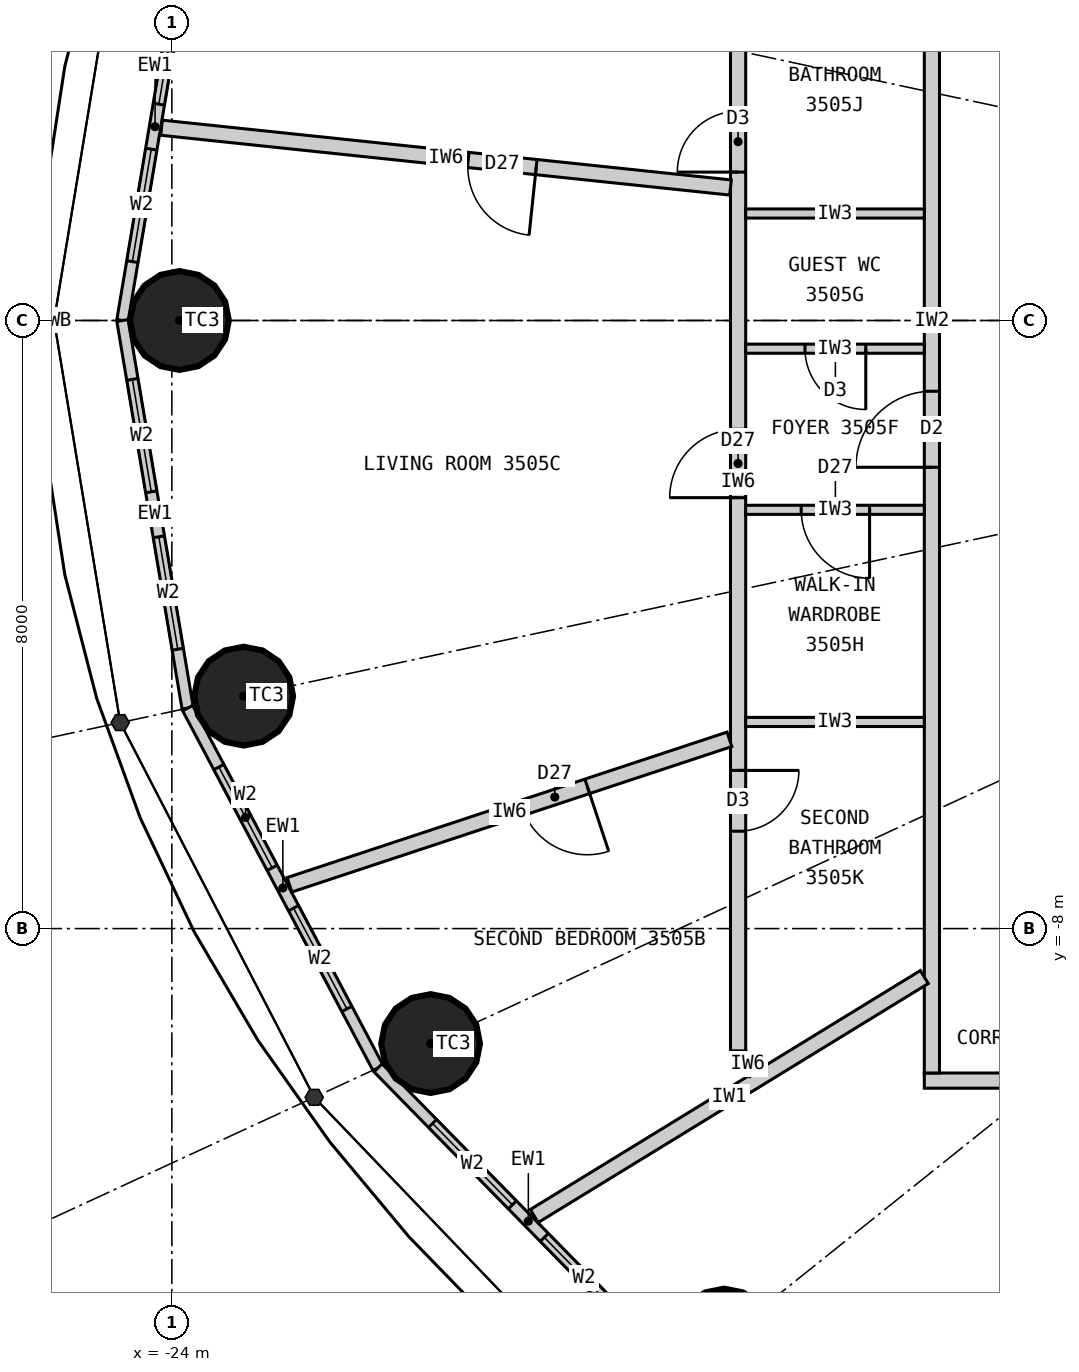
"""IFC4 building model, lengths in metres.
Left out: names, types, materials, properties, quantities, classifications, styles, units other than length and angle.
Written with IfcOpenShell. Run it as: python <this file> out.ifc"""

import sys

from ifc_helpers import new_model, si_unit, direction, frame, frame_2d, origin, origin_2d, place, context, subcontext, project, spatial, rectangle, circle, extrude, clip, halfspace, element, fill, save


model = new_model("IFC4")
c1 = context("Model", 3, precision=1e-05, world=origin(), true_north=direction((0.0, 1.0)))
c2 = subcontext(c1, "Body", "Model", "MODEL_VIEW")
j1 = project(units=[si_unit("LENGTHUNIT", "METRE"), si_unit("PLANEANGLEUNIT", "RADIAN")], contexts=[c1])
p1 = place(None, origin())
s1 = spatial("IfcSite", under=j1, at=p1, CompositionType="ELEMENT")
p2 = place(p1, origin())
s2 = spatial("IfcBuilding", under=s1, at=p2, CompositionType="ELEMENT")
p3 = place(p2, frame((0.0, 0.0, 135.3)))
s3 = spatial("IfcBuildingStorey", under=s2, at=p3, CompositionType="ELEMENT", Elevation=135.3)
for number, where, z_axis, x_axis in (
    (1, (-23.9, 0.0, 0.0), (0.0, 0.0, 1.0), (1.0, 0.0, 0.0)),
    (2, (-23.055, -4.942, 0.0), (0.0, 0.0, 1.0), (1.0, 0.0, 0.0)),
    (3, (-20.596, -9.513, 0.0), (0.0, 0.0, 1.0), (1.0, 0.0, 0.0)),
    (4, (-16.734, -13.387, 0.0), (0.0, 0.0, 1.0), (1.0, 0.0, 0.0)),
):
    element("IfcColumn", number, at=place(p3, frame(where, z_axis=z_axis, x_axis=x_axis)), inside=s3, PredefinedType="COLUMN", context=c2, shape_type="Clipping", body=[
        clip(extrude(circle(Radius=0.65, at=origin_2d()), origin(), (0.0, 0.0, 1.0), 3.3), halfspace(frame((0.0, 0.0, 2.25), z_axis=(0.0, 0.0, 1.0), x_axis=(1.0, 0.0, 0.0)), False)),
    ])
p4 = place(p3, frame((-23.792, 5.1, 0.0), z_axis=(0.0, 0.0, 1.0), x_axis=(-0.165883894218, -0.986145290329, 0.0)))
e5 = element("IfcWall", 5, at=p4, inside=s3, PredefinedType="ELEMENTEDWALL", context=c2, shape_type="SweptSolid", body=[
    extrude(rectangle(XDim=5.172, YDim=0.15, at=frame_2d((2.586, 0.0))), origin(), (0.0, 0.0, 1.0), 3.05),
])
p5 = place(p4, frame((0.786, 0.0, 0.9)))
e6 = element("IfcOpeningElement", 6, at=p5, cuts=e5, PredefinedType="OPENING", context=c2, shape_type="SweptSolid", body=[
    extrude(rectangle(XDim=1.5, YDim=1.9, at=frame_2d((0.75, 0.95))), frame((0.0, 0.085, 0.0), z_axis=(0.0, -1.0, 0.0), x_axis=(1.0, 0.0, 0.0)), (0.0, 0.0, 1.0), 0.17),
])
p6 = place(p4, frame((2.886, 0.0, 0.9)))
e7 = element("IfcOpeningElement", 7, at=p6, cuts=e5, PredefinedType="OPENING", context=c2, shape_type="SweptSolid", body=[
    extrude(rectangle(XDim=1.5, YDim=1.9, at=frame_2d((0.75, 0.95))), frame((0.0, 0.085, 0.0), z_axis=(0.0, -1.0, 0.0), x_axis=(1.0, 0.0, 0.0)), (0.0, 0.0, 1.0), 0.17),
])
p7 = place(p3, frame((-24.65, 0.0, 0.0), z_axis=(0.0, 0.0, 1.0), x_axis=(0.165883894218, -0.986145290329, 0.0)))
e8 = element("IfcWall", 8, at=p7, inside=s3, PredefinedType="ELEMENTEDWALL", context=c2, shape_type="SweptSolid", body=[
    extrude(rectangle(XDim=5.172, YDim=0.15, at=frame_2d((2.586, 0.0))), origin(), (0.0, 0.0, 1.0), 3.05),
])
p8 = place(p7, frame((0.786, 0.0, 0.9)))
e9 = element("IfcOpeningElement", 9, at=p8, cuts=e8, PredefinedType="OPENING", context=c2, shape_type="SweptSolid", body=[
    extrude(rectangle(XDim=1.5, YDim=1.9, at=frame_2d((0.75, 0.95))), frame((0.0, 0.085, 0.0), z_axis=(0.0, -1.0, 0.0), x_axis=(1.0, 0.0, 0.0)), (0.0, 0.0, 1.0), 0.17),
])
p9 = place(p7, frame((2.886, 0.0, 0.9)))
e10 = element("IfcOpeningElement", 10, at=p9, cuts=e8, PredefinedType="OPENING", context=c2, shape_type="SweptSolid", body=[
    extrude(rectangle(XDim=1.5, YDim=1.9, at=frame_2d((0.75, 0.95))), frame((0.0, 0.085, 0.0), z_axis=(0.0, -1.0, 0.0), x_axis=(1.0, 0.0, 0.0)), (0.0, 0.0, 1.0), 0.17),
])
p10 = place(p3, frame((-23.792, -5.1, 0.0), z_axis=(0.0, 0.0, 1.0), x_axis=(0.467814388454, -0.883826735257, 0.0)))
e11 = element("IfcWall", 11, at=p10, inside=s3, PredefinedType="ELEMENTEDWALL", context=c2, shape_type="SweptSolid", body=[
    extrude(rectangle(XDim=5.354, YDim=0.15, at=frame_2d((2.677, 0.0))), origin(), (0.0, 0.0, 1.0), 3.05),
])
p11 = place(p10, frame((0.877, 0.0, 0.9)))
e12 = element("IfcOpeningElement", 12, at=p11, cuts=e11, PredefinedType="OPENING", context=c2, shape_type="SweptSolid", body=[
    extrude(rectangle(XDim=1.5, YDim=1.9, at=frame_2d((0.75, 0.95))), frame((0.0, 0.085, 0.0), z_axis=(0.0, -1.0, 0.0), x_axis=(1.0, 0.0, 0.0)), (0.0, 0.0, 1.0), 0.17),
])
p12 = place(p10, frame((2.977, 0.0, 0.9)))
e13 = element("IfcOpeningElement", 13, at=p12, cuts=e11, PredefinedType="OPENING", context=c2, shape_type="SweptSolid", body=[
    extrude(rectangle(XDim=1.5, YDim=1.9, at=frame_2d((0.75, 0.95))), frame((0.0, 0.085, 0.0), z_axis=(0.0, -1.0, 0.0), x_axis=(1.0, 0.0, 0.0)), (0.0, 0.0, 1.0), 0.17),
])
p13 = place(p3, frame((-21.287, -9.832, 0.0), z_axis=(0.0, 0.0, 1.0), x_axis=(0.700136650834, -0.714008872605, 0.0)))
e14 = element("IfcWall", 14, at=p13, inside=s3, PredefinedType="ELEMENTEDWALL", context=c2, shape_type="SweptSolid", body=[
    extrude(rectangle(XDim=5.649, YDim=0.15, at=frame_2d((2.825, 0.0))), origin(), (0.0, 0.0, 1.0), 3.05),
])
p14 = place(p13, frame((1.025, 0.0, 0.9)))
e15 = element("IfcOpeningElement", 15, at=p14, cuts=e14, PredefinedType="OPENING", context=c2, shape_type="SweptSolid", body=[
    extrude(rectangle(XDim=1.5, YDim=1.9, at=frame_2d((0.75, 0.95))), frame((0.0, 0.085, 0.0), z_axis=(0.0, -1.0, 0.0), x_axis=(1.0, 0.0, 0.0)), (0.0, 0.0, 1.0), 0.17),
])
p15 = place(p13, frame((3.125, 0.0, 0.9)))
e16 = element("IfcOpeningElement", 16, at=p15, cuts=e14, PredefinedType="OPENING", context=c2, shape_type="SweptSolid", body=[
    extrude(rectangle(XDim=1.5, YDim=1.9, at=frame_2d((0.75, 0.95))), frame((0.0, 0.085, 0.0), z_axis=(0.0, -1.0, 0.0), x_axis=(1.0, 0.0, 0.0)), (0.0, 0.0, 1.0), 0.17),
])
p16 = place(p3, frame((14.1, -10.0, 0.0), z_axis=(0.0, 0.0, 1.0), x_axis=(-1.0, 0.0, 0.0)))
e17 = element("IfcWall", 17, at=p16, inside=s3, PredefinedType="PARTITIONING", context=c2, shape_type="SweptSolid", body=[
    extrude(rectangle(XDim=28.2, YDim=0.2, at=frame_2d((14.1, 0.0))), origin(), (0.0, 0.0, 1.0), 3.05),
])
p17 = place(p16, frame((25.754, 0.0, 0.0)))
e18 = element("IfcOpeningElement", 18, at=p17, cuts=e17, PredefinedType="OPENING", context=c2, shape_type="SweptSolid", body=[
    extrude(rectangle(XDim=1.0, YDim=2.2, at=frame_2d((0.5, 1.1))), frame((0.0, 0.11, 0.0), z_axis=(0.0, -1.0, 0.0), x_axis=(1.0, 0.0, 0.0)), (0.0, 0.0, 1.0), 0.22),
])
p18 = place(p16, frame((18.029, 0.0, 0.0)))
e19 = element("IfcOpeningElement", 19, at=p18, cuts=e17, PredefinedType="OPENING", context=c2, shape_type="SweptSolid", body=[
    extrude(rectangle(XDim=1.0, YDim=2.2, at=frame_2d((0.5, 1.1))), frame((0.0, 0.11, 0.0), z_axis=(0.0, -1.0, 0.0), x_axis=(1.0, 0.0, 0.0)), (0.0, 0.0, 1.0), 0.22),
])
p19 = place(p16, frame((12.884, 0.0, 0.0)))
e20 = element("IfcOpeningElement", 20, at=p19, cuts=e17, PredefinedType="OPENING", context=c2, shape_type="SweptSolid", body=[
    extrude(rectangle(XDim=1.0, YDim=2.2, at=frame_2d((0.5, 1.1))), frame((0.0, 0.11, 0.0), z_axis=(0.0, -1.0, 0.0), x_axis=(1.0, 0.0, 0.0)), (0.0, 0.0, 1.0), 0.22),
])
p20 = place(p16, frame((9.075, 0.0, 0.0)))
e21 = element("IfcOpeningElement", 21, at=p20, cuts=e17, PredefinedType="OPENING", context=c2, shape_type="SweptSolid", body=[
    extrude(rectangle(XDim=1.0, YDim=2.2, at=frame_2d((0.5, 1.1))), frame((0.0, 0.11, 0.0), z_axis=(0.0, -1.0, 0.0), x_axis=(1.0, 0.0, 0.0)), (0.0, 0.0, 1.0), 0.22),
])
p21 = place(p16, frame((3.59, 0.0, 0.0)))
e22 = element("IfcOpeningElement", 22, at=p21, cuts=e17, PredefinedType="OPENING", context=c2, shape_type="SweptSolid", body=[
    extrude(rectangle(XDim=1.0, YDim=2.2, at=frame_2d((0.5, 1.1))), frame((0.0, 0.11, 0.0), z_axis=(0.0, -1.0, 0.0), x_axis=(1.0, 0.0, 0.0)), (0.0, 0.0, 1.0), 0.22),
])
p22 = place(p3, frame((-14.0, 9.9, 0.0), z_axis=(0.0, 0.0, 1.0), x_axis=(0.0, -1.0, 0.0)))
e23 = element("IfcWall", 23, at=p22, inside=s3, PredefinedType="PARTITIONING", context=c2, shape_type="SweptSolid", body=[
    extrude(rectangle(XDim=19.8, YDim=0.2, at=frame_2d((9.9, 0.0))), origin(), (0.0, 0.0, 1.0), 3.05),
])
p23 = place(p22, frame((1.025, 0.0, 0.0)))
e24 = element("IfcOpeningElement", 24, at=p23, cuts=e23, PredefinedType="OPENING", context=c2, shape_type="SweptSolid", body=[
    extrude(rectangle(XDim=1.0, YDim=2.2, at=frame_2d((0.5, 1.1))), frame((0.0, 0.11, 0.0), z_axis=(0.0, -1.0, 0.0), x_axis=(1.0, 0.0, 0.0)), (0.0, 0.0, 1.0), 0.22),
])
p24 = place(p22, frame((10.831, 0.0, 0.0)))
e25 = element("IfcOpeningElement", 25, at=p24, cuts=e23, PredefinedType="OPENING", context=c2, shape_type="SweptSolid", body=[
    extrude(rectangle(XDim=1.0, YDim=2.2, at=frame_2d((0.5, 1.1))), frame((0.0, 0.11, 0.0), z_axis=(0.0, -1.0, 0.0), x_axis=(1.0, 0.0, 0.0)), (0.0, 0.0, 1.0), 0.22),
])
p25 = place(p3, frame((-14.1, -8.638, 0.0), z_axis=(0.0, 0.0, 1.0), x_axis=(-0.852706758009, -0.5223898782, 0.0)))
e26 = element("IfcWall", 26, at=p25, inside=s3, PredefinedType="PARTITIONING", context=c2, shape_type="SweptSolid", body=[
    extrude(rectangle(XDim=6.019, YDim=0.2, at=frame_2d((3.009, 0.0))), origin(), (0.0, 0.0, 1.0), 3.05),
])
p26 = place(p3, frame((-16.55, 5.351, 0.0), z_axis=(0.0, 0.0, 1.0), x_axis=(0.0, -1.0, 0.0)))
e27 = element("IfcWall", 27, at=p26, inside=s3, PredefinedType="PARTITIONING", context=c2, shape_type="SweptSolid", body=[
    extrude(rectangle(XDim=14.96, YDim=0.2, at=frame_2d((7.48, 0.0))), origin(), (0.0, 0.0, 1.0), 3.05),
])
p27 = place(p26, frame((2.599, 0.0, 0.0)))
e28 = element("IfcOpeningElement", 28, at=p27, cuts=e27, PredefinedType="OPENING", context=c2, shape_type="SweptSolid", body=[
    extrude(rectangle(XDim=0.8, YDim=2.1, at=frame_2d((0.4, 1.05))), frame((0.0, 0.11, 0.0), z_axis=(0.0, -1.0, 0.0), x_axis=(1.0, 0.0, 0.0)), (0.0, 0.0, 1.0), 0.22),
])
p28 = place(p26, frame((11.27, 0.0, 0.0)))
e29 = element("IfcOpeningElement", 29, at=p28, cuts=e27, PredefinedType="OPENING", context=c2, shape_type="SweptSolid", body=[
    extrude(rectangle(XDim=0.8, YDim=2.1, at=frame_2d((0.4, 1.05))), frame((0.0, 0.11, 0.0), z_axis=(0.0, -1.0, 0.0), x_axis=(1.0, 0.0, 0.0)), (0.0, 0.0, 1.0), 0.22),
])
p29 = place(p26, frame((6.782, 0.0, 0.0)))
e30 = element("IfcOpeningElement", 30, at=p29, cuts=e27, PredefinedType="OPENING", context=c2, shape_type="SweptSolid", body=[
    extrude(rectangle(XDim=0.9, YDim=2.1, at=frame_2d((0.45, 1.05))), frame((0.0, 0.11, 0.0), z_axis=(0.0, -1.0, 0.0), x_axis=(1.0, 0.0, 0.0)), (0.0, 0.0, 1.0), 0.22),
])
p30 = place(p3, frame((-16.521, -9.679, 0.0), z_axis=(0.0, 0.0, 1.0), x_axis=(0.707106781187, -0.707106781187, 0.0)))
e31 = element("IfcWall", 31, at=p30, inside=s3, PredefinedType="PARTITIONING", context=c2, shape_type="SweptSolid", body=[
    extrude(rectangle(XDim=0.278, YDim=0.2, at=frame_2d((0.139, 0.0))), origin(), (0.0, 0.0, 1.0), 3.05),
])
p31 = place(p3, frame((-16.65, 1.75, 0.0), z_axis=(0.0, 0.0, 1.0), x_axis=(-0.994524630042, 0.104502441313, 0.0)))
e32 = element("IfcWall", 32, at=p31, inside=s3, PredefinedType="PARTITIONING", context=c2, shape_type="SweptSolid", body=[
    extrude(rectangle(XDim=7.527, YDim=0.2, at=frame_2d((3.764, 0.0))), origin(), (0.0, 0.0, 1.0), 3.05),
])
p32 = place(p31, frame((2.57, 0.0, 0.0)))
e33 = element("IfcOpeningElement", 33, at=p32, cuts=e32, PredefinedType="OPENING", context=c2, shape_type="SweptSolid", body=[
    extrude(rectangle(XDim=0.9, YDim=2.1, at=frame_2d((0.45, 1.05))), frame((0.0, 0.11, 0.0), z_axis=(0.0, -1.0, 0.0), x_axis=(1.0, 0.0, 0.0)), (0.0, 0.0, 1.0), 0.22),
])
p33 = place(p3, frame((-16.664, -5.51, 0.0), z_axis=(0.0, 0.0, 1.0), x_axis=(-0.949449376032, -0.313920184686, 0.0)))
e34 = element("IfcWall", 34, at=p33, inside=s3, PredefinedType="PARTITIONING", context=c2, shape_type="SweptSolid", body=[
    extrude(rectangle(XDim=6.096, YDim=0.2, at=frame_2d((3.048, 0.0))), origin(), (0.0, 0.0, 1.0), 3.05),
])
p34 = place(p33, frame((1.97, 0.0, 0.0)))
e35 = element("IfcOpeningElement", 35, at=p34, cuts=e34, PredefinedType="OPENING", context=c2, shape_type="SweptSolid", body=[
    extrude(rectangle(XDim=0.9, YDim=2.1, at=frame_2d((0.45, 1.05))), frame((0.0, 0.11, 0.0), z_axis=(0.0, -1.0, 0.0), x_axis=(1.0, 0.0, 0.0)), (0.0, 0.0, 1.0), 0.22),
])
p35 = place(p3, frame((-14.1, 1.408, 0.0), z_axis=(0.0, 0.0, 1.0), x_axis=(-1.0, 0.0, 0.0)))
e36 = element("IfcWall", 36, at=p35, inside=s3, PredefinedType="PARTITIONING", context=c2, shape_type="SweptSolid", body=[
    extrude(rectangle(XDim=2.35, YDim=0.12, at=frame_2d((1.175, 0.0))), origin(), (0.0, 0.0, 1.0), 2.3),
])
p36 = place(p3, frame((-14.1, -0.371, 0.0), z_axis=(0.0, 0.0, 1.0), x_axis=(-1.0, 0.0, 0.0)))
e37 = element("IfcWall", 37, at=p36, inside=s3, PredefinedType="PARTITIONING", context=c2, shape_type="SweptSolid", body=[
    extrude(rectangle(XDim=2.35, YDim=0.12, at=frame_2d((1.175, 0.0))), origin(), (0.0, 0.0, 1.0), 3.05),
])
p37 = place(p36, frame((0.77, 0.0, 0.0)))
e38 = element("IfcOpeningElement", 38, at=p37, cuts=e37, PredefinedType="OPENING", context=c2, shape_type="SweptSolid", body=[
    extrude(rectangle(XDim=0.8, YDim=2.1, at=frame_2d((0.4, 1.05))), frame((0.0, 0.07, 0.0), z_axis=(0.0, -1.0, 0.0), x_axis=(1.0, 0.0, 0.0)), (0.0, 0.0, 1.0), 0.14),
])
p38 = place(p3, frame((-14.1, -2.491, 0.0), z_axis=(0.0, 0.0, 1.0), x_axis=(-1.0, 0.0, 0.0)))
e39 = element("IfcWall", 39, at=p38, inside=s3, PredefinedType="PARTITIONING", context=c2, shape_type="SweptSolid", body=[
    extrude(rectangle(XDim=2.35, YDim=0.12, at=frame_2d((1.175, 0.0))), origin(), (0.0, 0.0, 1.0), 3.05),
])
p39 = place(p38, frame((0.72, 0.0, 0.0)))
e40 = element("IfcOpeningElement", 40, at=p39, cuts=e39, PredefinedType="OPENING", context=c2, shape_type="SweptSolid", body=[
    extrude(rectangle(XDim=0.9, YDim=2.1, at=frame_2d((0.45, 1.05))), frame((0.0, 0.07, 0.0), z_axis=(0.0, -1.0, 0.0), x_axis=(1.0, 0.0, 0.0)), (0.0, 0.0, 1.0), 0.14),
])
p40 = place(p3, frame((-14.1, -5.281, 0.0), z_axis=(0.0, 0.0, 1.0), x_axis=(-1.0, 0.0, 0.0)))
e41 = element("IfcWall", 41, at=p40, inside=s3, PredefinedType="PARTITIONING", context=c2, shape_type="SweptSolid", body=[
    extrude(rectangle(XDim=2.35, YDim=0.12, at=frame_2d((1.175, 0.0))), origin(), (0.0, 0.0, 1.0), 3.05),
])
p41 = place(p5, origin())
e42 = element("IfcWindow", 42, at=p41, inside=s3, PartitioningType="SINGLE_PANEL", PredefinedType="WINDOW", context=c2, shape_type="SweptSolid", body=[
    extrude(rectangle(XDim=1.5, YDim=1.9, at=frame_2d((0.75, 0.95))), frame((0.0, 0.03, 0.0), z_axis=(0.0, -1.0, 0.0), x_axis=(1.0, 0.0, 0.0)), (0.0, 0.0, 1.0), 0.06),
])
fill(e6, e42)
p42 = place(p6, origin())
e43 = element("IfcWindow", 43, at=p42, inside=s3, PartitioningType="SINGLE_PANEL", PredefinedType="WINDOW", context=c2, shape_type="SweptSolid", body=[
    extrude(rectangle(XDim=1.5, YDim=1.9, at=frame_2d((0.75, 0.95))), frame((0.0, 0.03, 0.0), z_axis=(0.0, -1.0, 0.0), x_axis=(1.0, 0.0, 0.0)), (0.0, 0.0, 1.0), 0.06),
])
fill(e7, e43)
p43 = place(p8, origin())
e44 = element("IfcWindow", 44, at=p43, inside=s3, PartitioningType="SINGLE_PANEL", PredefinedType="WINDOW", context=c2, shape_type="SweptSolid", body=[
    extrude(rectangle(XDim=1.5, YDim=1.9, at=frame_2d((0.75, 0.95))), frame((0.0, 0.03, 0.0), z_axis=(0.0, -1.0, 0.0), x_axis=(1.0, 0.0, 0.0)), (0.0, 0.0, 1.0), 0.06),
])
fill(e9, e44)
p44 = place(p9, origin())
e45 = element("IfcWindow", 45, at=p44, inside=s3, PartitioningType="SINGLE_PANEL", PredefinedType="WINDOW", context=c2, shape_type="SweptSolid", body=[
    extrude(rectangle(XDim=1.5, YDim=1.9, at=frame_2d((0.75, 0.95))), frame((0.0, 0.03, 0.0), z_axis=(0.0, -1.0, 0.0), x_axis=(1.0, 0.0, 0.0)), (0.0, 0.0, 1.0), 0.06),
])
fill(e10, e45)
p45 = place(p11, origin())
e46 = element("IfcWindow", 46, at=p45, inside=s3, PartitioningType="SINGLE_PANEL", PredefinedType="WINDOW", context=c2, shape_type="SweptSolid", body=[
    extrude(rectangle(XDim=1.5, YDim=1.9, at=frame_2d((0.75, 0.95))), frame((0.0, 0.03, 0.0), z_axis=(0.0, -1.0, 0.0), x_axis=(1.0, 0.0, 0.0)), (0.0, 0.0, 1.0), 0.06),
])
fill(e12, e46)
p46 = place(p12, origin())
e47 = element("IfcWindow", 47, at=p46, inside=s3, PartitioningType="SINGLE_PANEL", PredefinedType="WINDOW", context=c2, shape_type="SweptSolid", body=[
    extrude(rectangle(XDim=1.5, YDim=1.9, at=frame_2d((0.75, 0.95))), frame((0.0, 0.03, 0.0), z_axis=(0.0, -1.0, 0.0), x_axis=(1.0, 0.0, 0.0)), (0.0, 0.0, 1.0), 0.06),
])
fill(e13, e47)
p47 = place(p14, origin())
e48 = element("IfcWindow", 48, at=p47, inside=s3, PartitioningType="SINGLE_PANEL", PredefinedType="WINDOW", context=c2, shape_type="SweptSolid", body=[
    extrude(rectangle(XDim=1.5, YDim=1.9, at=frame_2d((0.75, 0.95))), frame((0.0, 0.03, 0.0), z_axis=(0.0, -1.0, 0.0), x_axis=(1.0, 0.0, 0.0)), (0.0, 0.0, 1.0), 0.06),
])
fill(e15, e48)
p48 = place(p15, origin())
e49 = element("IfcWindow", 49, at=p48, inside=s3, PartitioningType="SINGLE_PANEL", PredefinedType="WINDOW", context=c2, shape_type="SweptSolid", body=[
    extrude(rectangle(XDim=1.5, YDim=1.9, at=frame_2d((0.75, 0.95))), frame((0.0, 0.03, 0.0), z_axis=(0.0, -1.0, 0.0), x_axis=(1.0, 0.0, 0.0)), (0.0, 0.0, 1.0), 0.06),
])
fill(e16, e49)
p49 = place(p24, origin())
e50 = element("IfcDoor", 50, at=p49, inside=s3, OperationType="SINGLE_SWING_RIGHT", PredefinedType="DOOR", context=c2, shape_type="SweptSolid", body=[
    extrude(rectangle(XDim=1.0, YDim=2.2, at=frame_2d((0.5, 1.1))), frame((0.0, 0.025, 0.0), z_axis=(0.0, -1.0, 0.0), x_axis=(1.0, 0.0, 0.0)), (0.0, 0.0, 1.0), 0.05),
])
fill(e25, e50)
p50 = place(p27, origin())
e51 = element("IfcDoor", 51, at=p50, inside=s3, OperationType="SINGLE_SWING_RIGHT", PredefinedType="DOOR", context=c2, shape_type="SweptSolid", body=[
    extrude(rectangle(XDim=0.8, YDim=2.1, at=frame_2d((0.4, 1.05))), frame((0.0, 0.025, 0.0), z_axis=(0.0, -1.0, 0.0), x_axis=(1.0, 0.0, 0.0)), (0.0, 0.0, 1.0), 0.05),
])
fill(e28, e51)
p51 = place(p37, origin())
e52 = element("IfcDoor", 52, at=p51, inside=s3, OperationType="SINGLE_SWING_LEFT", PredefinedType="DOOR", context=c2, shape_type="SweptSolid", body=[
    extrude(rectangle(XDim=0.8, YDim=2.1, at=frame_2d((0.4, 1.05))), frame((0.0, 0.025, 0.0), z_axis=(0.0, -1.0, 0.0), x_axis=(1.0, 0.0, 0.0)), (0.0, 0.0, 1.0), 0.05),
])
fill(e38, e52)
p52 = place(p39, origin())
e53 = element("IfcDoor", 53, at=p52, inside=s3, OperationType="SINGLE_SWING_LEFT", PredefinedType="DOOR", context=c2, shape_type="SweptSolid", body=[
    extrude(rectangle(XDim=0.9, YDim=2.1, at=frame_2d((0.45, 1.05))), frame((0.0, 0.025, 0.0), z_axis=(0.0, -1.0, 0.0), x_axis=(1.0, 0.0, 0.0)), (0.0, 0.0, 1.0), 0.05),
])
fill(e40, e53)
p53 = place(p28, origin())
e54 = element("IfcDoor", 54, at=p53, inside=s3, OperationType="SINGLE_SWING_LEFT", PredefinedType="DOOR", context=c2, shape_type="SweptSolid", body=[
    extrude(rectangle(XDim=0.8, YDim=2.1, at=frame_2d((0.4, 1.05))), frame((0.0, 0.025, 0.0), z_axis=(0.0, -1.0, 0.0), x_axis=(1.0, 0.0, 0.0)), (0.0, 0.0, 1.0), 0.05),
])
fill(e29, e54)
p54 = place(p29, origin())
e55 = element("IfcDoor", 55, at=p54, inside=s3, OperationType="SINGLE_SWING_RIGHT", PredefinedType="DOOR", context=c2, shape_type="SweptSolid", body=[
    extrude(rectangle(XDim=0.9, YDim=2.1, at=frame_2d((0.45, 1.05))), frame((0.0, 0.025, 0.0), z_axis=(0.0, -1.0, 0.0), x_axis=(1.0, 0.0, 0.0)), (0.0, 0.0, 1.0), 0.05),
])
fill(e30, e55)
p55 = place(p32, origin())
e56 = element("IfcDoor", 56, at=p55, inside=s3, OperationType="SINGLE_SWING_LEFT", PredefinedType="DOOR", context=c2, shape_type="SweptSolid", body=[
    extrude(rectangle(XDim=0.9, YDim=2.1, at=frame_2d((0.45, 1.05))), frame((0.0, 0.025, 0.0), z_axis=(0.0, -1.0, 0.0), x_axis=(1.0, 0.0, 0.0)), (0.0, 0.0, 1.0), 0.05),
])
fill(e33, e56)
p56 = place(p34, origin())
e57 = element("IfcDoor", 57, at=p56, inside=s3, OperationType="SINGLE_SWING_LEFT", PredefinedType="DOOR", context=c2, shape_type="SweptSolid", body=[
    extrude(rectangle(XDim=0.9, YDim=2.1, at=frame_2d((0.45, 1.05))), frame((0.0, 0.025, 0.0), z_axis=(0.0, -1.0, 0.0), x_axis=(1.0, 0.0, 0.0)), (0.0, 0.0, 1.0), 0.05),
])
fill(e35, e57)
save(model, sys.argv[1])
